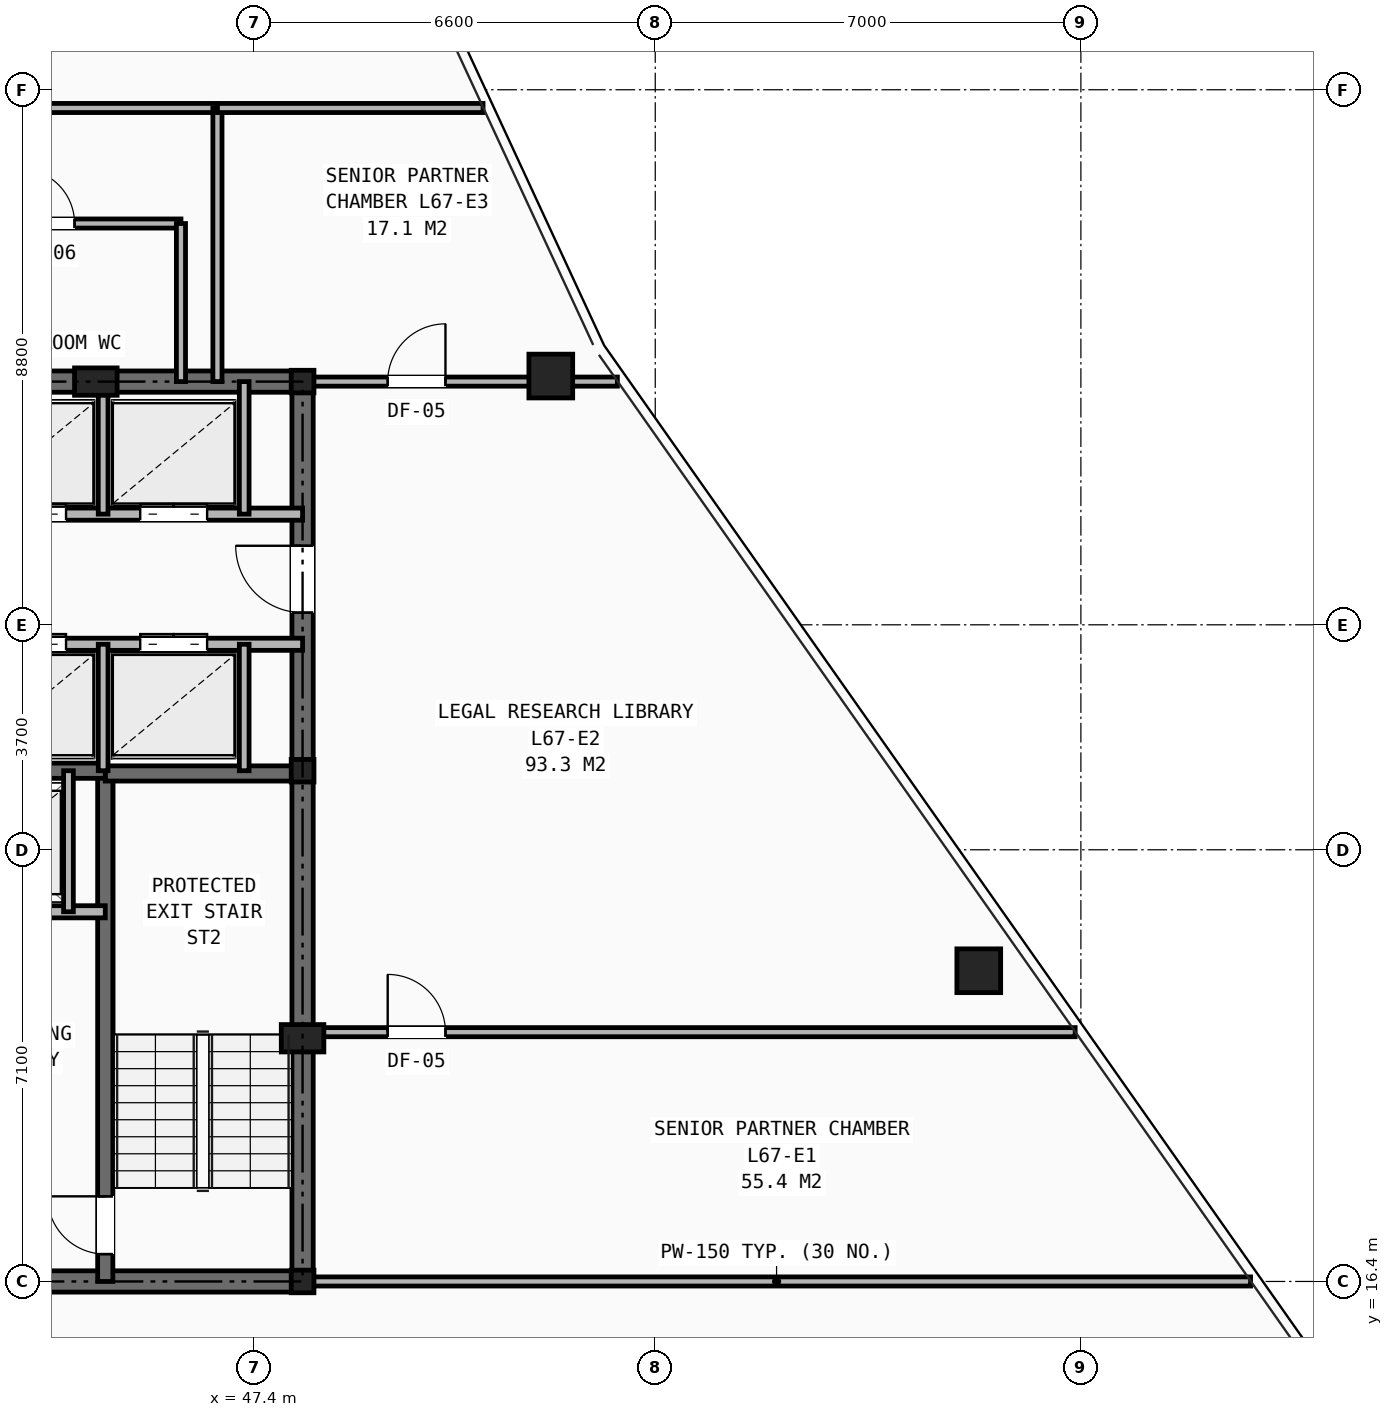
"""IFC4 building model, lengths in metres.
Left out: names, types, materials, properties, quantities, classifications, styles, units other than length and angle.
Written with IfcOpenShell. Run it as: python <this file> out.ifc"""

import sys

from ifc_helpers import new_model, si_unit, direction, frame, frame_2d, origin, origin_2d, place, context, subcontext, project, spatial, rectangle, hollow_rectangle, i_section, extrude, element, fill, save


model = new_model("IFC4")
c1 = context("Model", 3, precision=1e-05, world=origin(), true_north=direction((0.0, 1.0)))
c2 = subcontext(c1, "Body", "Model", "MODEL_VIEW")
j1 = project(units=[si_unit("LENGTHUNIT", "METRE"), si_unit("PLANEANGLEUNIT", "RADIAN")], contexts=[c1])
p1 = place(None, origin())
s1 = spatial("IfcSite", under=j1, at=p1, CompositionType="ELEMENT")
p2 = place(p1, origin())
s2 = spatial("IfcBuilding", under=s1, at=p2, CompositionType="ELEMENT")
p3 = place(p2, frame((0.0, 0.0, 236.4)))
s3 = spatial("IfcBuildingStorey", under=s2, at=p3, CompositionType="ELEMENT", Elevation=236.4)
for number, where, z_axis, x_axis in (
    (1, (48.2, 16.4, 0.0), (0.0, 0.0, 1.0), (1.0, 0.0, 0.0)),
    (2, (48.2, 24.8, 0.0), (0.0, 0.0, 1.0), (1.0, 0.0, 0.0)),
    (3, (48.2, 31.2, 0.0), (0.0, 0.0, 1.0), (1.0, 0.0, 0.0)),
):
    element("IfcColumn", number, at=place(p3, frame(where, z_axis=z_axis, x_axis=x_axis)), inside=s3, PredefinedType="COLUMN", context=c2, shape_type="SweptSolid", body=[
        extrude(i_section(OverallWidth=0.374, OverallDepth=0.372, WebThickness=0.016, FlangeThickness=0.026, at=origin_2d()), origin(), (0.0, 0.0, 1.0), 3.5),
    ])
for number, where, z_axis, x_axis in (
    (4, (48.2, 20.4, 0.0), (0.0, 0.0, 1.0), (1.0, 0.0, 0.0)),
    (5, (44.8, 31.2, 0.0), (0.0, 0.0, 1.0), (1.0, 0.0, 0.0)),
):
    element("IfcColumn", number, at=place(p3, frame(where, z_axis=z_axis, x_axis=x_axis)), inside=s3, PredefinedType="PILASTER", context=c2, shape_type="SweptSolid", body=[
        extrude(rectangle(XDim=0.7, YDim=0.45, at=origin_2d()), origin(), (0.0, 0.0, 1.0), 3.5),
    ])
for number, where, z_axis, x_axis in (
    (6, (59.321, 21.51, 0.0), (0.0, 0.0, 1.0), (1.0, 0.0, 0.0)),
    (7, (52.282, 31.291, 0.0), (0.0, 0.0, 1.0), (1.0, 0.0, 0.0)),
):
    element("IfcColumn", number, at=place(p3, frame(where, z_axis=z_axis, x_axis=x_axis)), inside=s3, PredefinedType="COLUMN", context=c2, shape_type="SweptSolid", body=[
        extrude(hollow_rectangle(XDim=0.72, YDim=0.72, WallThickness=0.05, at=origin_2d()), origin(), (0.0, 0.0, 1.0), 3.5),
    ])
p4 = place(p3, frame((31.8, 16.4, 0.0), z_axis=(0.0, 0.0, 1.0), x_axis=(1.0, 0.0, 0.0)))
e8 = element("IfcWall", 8, at=p4, inside=s3, PredefinedType="SHEAR", context=c2, shape_type="SweptSolid", body=[
    extrude(rectangle(XDim=16.4, YDim=0.35, at=frame_2d((8.2, 0.0))), origin(), (0.0, 0.0, 1.0), 3.25),
])
p5 = place(p4, frame((7.75, 0.0, 0.0)))
e9 = element("IfcOpeningElement", 9, at=p5, cuts=e8, PredefinedType="OPENING", context=c2, shape_type="SweptSolid", body=[
    extrude(rectangle(XDim=0.9, YDim=2.1, at=frame_2d((0.45, 1.05))), frame((0.0, 0.185, 0.0), z_axis=(0.0, -1.0, 0.0), x_axis=(1.0, 0.0, 0.0)), (0.0, 0.0, 1.0), 0.37),
])
p6 = place(p4, frame((4.2, 0.0, 0.0)))
e10 = element("IfcOpeningElement", 10, at=p6, cuts=e8, PredefinedType="OPENING", context=c2, shape_type="SweptSolid", body=[
    extrude(rectangle(XDim=0.95, YDim=2.1, at=frame_2d((0.475, 1.05))), frame((0.0, 0.185, 0.0), z_axis=(0.0, -1.0, 0.0), x_axis=(1.0, 0.0, 0.0)), (0.0, 0.0, 1.0), 0.37),
])
p7 = place(p4, frame((10.6, 0.0, 0.0)))
e11 = element("IfcOpeningElement", 11, at=p7, cuts=e8, PredefinedType="OPENING", context=c2, shape_type="SweptSolid", body=[
    extrude(rectangle(XDim=0.95, YDim=2.1, at=frame_2d((0.475, 1.05))), frame((0.0, 0.185, 0.0), z_axis=(0.0, -1.0, 0.0), x_axis=(1.0, 0.0, 0.0)), (0.0, 0.0, 1.0), 0.37),
])
p8 = place(p3, frame((31.8, 31.2, 0.0), z_axis=(0.0, 0.0, 1.0), x_axis=(1.0, 0.0, 0.0)))
e12 = element("IfcWall", 12, at=p8, inside=s3, PredefinedType="SHEAR", context=c2, shape_type="SweptSolid", body=[
    extrude(rectangle(XDim=16.4, YDim=0.35, at=frame_2d((8.2, 0.0))), origin(), (0.0, 0.0, 1.0), 3.25),
])
p9 = place(p3, frame((48.2, 16.4, 0.0), z_axis=(0.0, 0.0, 1.0), x_axis=(0.0, 1.0, 0.0)))
e13 = element("IfcWall", 13, at=p9, inside=s3, PredefinedType="SHEAR", context=c2, shape_type="SweptSolid", body=[
    extrude(rectangle(XDim=14.8, YDim=0.35, at=frame_2d((7.4, 0.0))), origin(), (0.0, 0.0, 1.0), 3.25),
])
p10 = place(p9, frame((11.0, 0.0, 0.0)))
e14 = element("IfcOpeningElement", 14, at=p10, cuts=e13, PredefinedType="OPENING", context=c2, shape_type="SweptSolid", body=[
    extrude(rectangle(XDim=1.1, YDim=2.15, at=frame_2d((0.55, 1.075))), frame((0.0, 0.185, 0.0), z_axis=(0.0, -1.0, 0.0), x_axis=(1.0, 0.0, 0.0)), (0.0, 0.0, 1.0), 0.37),
])
p11 = place(p3, frame((44.955, 16.4, 0.0), z_axis=(0.0, 0.0, 1.0), x_axis=(0.0, 1.0, 0.0)))
e15 = element("IfcWall", 15, at=p11, inside=s3, PredefinedType="SHEAR", context=c2, shape_type="SweptSolid", body=[
    extrude(rectangle(XDim=8.4, YDim=0.25, at=frame_2d((4.2, 0.0))), origin(), (0.0, 0.0, 1.0), 3.25),
])
p12 = place(p11, frame((0.45, 0.0, 0.0)))
e16 = element("IfcOpeningElement", 16, at=p12, cuts=e15, PredefinedType="OPENING", context=c2, shape_type="SweptSolid", body=[
    extrude(rectangle(XDim=0.95, YDim=2.1, at=frame_2d((0.475, 1.05))), frame((0.0, 0.135, 0.0), z_axis=(0.0, -1.0, 0.0), x_axis=(1.0, 0.0, 0.0)), (0.0, 0.0, 1.0), 0.27),
])
p13 = place(p3, frame((44.955, 24.755, 0.0), z_axis=(0.0, 0.0, 1.0), x_axis=(1.0, 0.0, 0.0)))
e17 = element("IfcWall", 17, at=p13, inside=s3, PredefinedType="SHEAR", context=c2, shape_type="SweptSolid", body=[
    extrude(rectangle(XDim=3.245, YDim=0.25, at=frame_2d((1.623, 0.0))), origin(), (0.0, 0.0, 1.0), 3.25),
])
p14 = place(p3, frame((35.045, 24.8, 0.0), z_axis=(0.0, 0.0, 1.0), x_axis=(1.0, 0.0, 0.0)))
e18 = element("IfcWall", 18, at=p14, inside=s3, PredefinedType="SHEAR", context=c2, shape_type="SweptSolid", body=[
    extrude(rectangle(XDim=9.91, YDim=0.25, at=frame_2d((4.955, 0.0))), origin(), (0.0, 0.0, 1.0), 3.25),
])
p15 = place(p3, frame((35.045, 22.48, 0.0), z_axis=(0.0, 0.0, 1.0), x_axis=(1.0, 0.0, 0.0)))
e19 = element("IfcWall", 19, at=p15, inside=s3, PredefinedType="SOLIDWALL", context=c2, shape_type="SweptSolid", body=[
    extrude(rectangle(XDim=9.91, YDim=0.2, at=frame_2d((4.955, 0.0))), origin(), (0.0, 0.0, 1.0), 3.25),
])
p16 = place(p15, frame((1.255, 0.0, 0.0)))
e20 = element("IfcOpeningElement", 20, at=p16, cuts=e19, PredefinedType="OPENING", context=c2, shape_type="SweptSolid", body=[
    extrude(rectangle(XDim=1.1, YDim=2.15, at=frame_2d((0.55, 1.075))), frame((0.0, 0.11, 0.0), z_axis=(0.0, -1.0, 0.0), x_axis=(1.0, 0.0, 0.0)), (0.0, 0.0, 1.0), 0.22),
])
p17 = place(p15, frame((7.555, 0.0, 0.0)))
e21 = element("IfcOpeningElement", 21, at=p17, cuts=e19, PredefinedType="OPENING", context=c2, shape_type="SweptSolid", body=[
    extrude(rectangle(XDim=1.1, YDim=2.15, at=frame_2d((0.55, 1.075))), frame((0.0, 0.11, 0.0), z_axis=(0.0, -1.0, 0.0), x_axis=(1.0, 0.0, 0.0)), (0.0, 0.0, 1.0), 0.22),
])
p18 = place(p15, frame((4.405, 0.0, 0.0)))
e22 = element("IfcOpeningElement", 22, at=p18, cuts=e19, PredefinedType="OPENING", context=c2, shape_type="SweptSolid", body=[
    extrude(rectangle(XDim=1.1, YDim=2.15, at=frame_2d((0.55, 1.075))), frame((0.0, 0.11, 0.0), z_axis=(0.0, -1.0, 0.0), x_axis=(1.0, 0.0, 0.0)), (0.0, 0.0, 1.0), 0.22),
])
p19 = place(p3, frame((44.35, 22.48, 0.0), z_axis=(0.0, 0.0, 1.0), x_axis=(0.0, 1.0, 0.0)))
e23 = element("IfcWall", 23, at=p19, inside=s3, PredefinedType="SOLIDWALL", context=c2, shape_type="SweptSolid", body=[
    extrude(rectangle(XDim=2.32, YDim=0.16, at=frame_2d((1.16, 0.0))), origin(), (0.0, 0.0, 1.0), 3.25),
])
p20 = place(p3, frame((31.8, 29.02, 0.0), z_axis=(0.0, 0.0, 1.0), x_axis=(1.0, 0.0, 0.0)))
e24 = element("IfcWall", 24, at=p20, inside=s3, PredefinedType="SOLIDWALL", context=c2, shape_type="SweptSolid", body=[
    extrude(rectangle(XDim=16.4, YDim=0.2, at=frame_2d((8.2, 0.0))), origin(), (0.0, 0.0, 1.0), 2.705),
])
p21 = place(p20, frame((0.55, 0.0, 0.0)))
e25 = element("IfcOpeningElement", 25, at=p21, cuts=e24, PredefinedType="OPENING", context=c2, shape_type="SweptSolid", body=[
    extrude(rectangle(XDim=0.85, YDim=2.05, at=frame_2d((0.425, 1.025))), frame((0.0, 0.11, 0.0), z_axis=(0.0, -1.0, 0.0), x_axis=(1.0, 0.0, 0.0)), (0.0, 0.0, 1.0), 0.22),
])
p22 = place(p20, frame((5.94, 0.0, 0.0)))
e26 = element("IfcOpeningElement", 26, at=p22, cuts=e24, PredefinedType="OPENING", context=c2, shape_type="SweptSolid", body=[
    extrude(rectangle(XDim=0.9, YDim=2.1, at=frame_2d((0.45, 1.05))), frame((0.0, 0.11, 0.0), z_axis=(0.0, -1.0, 0.0), x_axis=(1.0, 0.0, 0.0)), (0.0, 0.0, 1.0), 0.22),
])
p23 = place(p20, frame((11.41, 0.0, 0.0)))
e27 = element("IfcOpeningElement", 27, at=p23, cuts=e24, PredefinedType="OPENING", context=c2, shape_type="SweptSolid", body=[
    extrude(rectangle(XDim=1.1, YDim=2.15, at=frame_2d((0.55, 1.075))), frame((0.0, 0.11, 0.0), z_axis=(0.0, -1.0, 0.0), x_axis=(1.0, 0.0, 0.0)), (0.0, 0.0, 1.0), 0.22),
])
p24 = place(p20, frame((13.73, 0.0, 0.0)))
e28 = element("IfcOpeningElement", 28, at=p24, cuts=e24, PredefinedType="OPENING", context=c2, shape_type="SweptSolid", body=[
    extrude(rectangle(XDim=1.1, YDim=2.15, at=frame_2d((0.55, 1.075))), frame((0.0, 0.11, 0.0), z_axis=(0.0, -1.0, 0.0), x_axis=(1.0, 0.0, 0.0)), (0.0, 0.0, 1.0), 0.22),
])
p25 = place(p3, frame((33.82, 26.88, 0.0), z_axis=(0.0, 0.0, 1.0), x_axis=(1.0, 0.0, 0.0)))
e29 = element("IfcWall", 29, at=p25, inside=s3, PredefinedType="SOLIDWALL", context=c2, shape_type="SweptSolid", body=[
    extrude(rectangle(XDim=14.38, YDim=0.2, at=frame_2d((7.19, 0.0))), origin(), (0.0, 0.0, 1.0), 2.705),
])
p26 = place(p25, frame((3.92, 0.0, 0.0)))
e30 = element("IfcOpeningElement", 30, at=p26, cuts=e29, PredefinedType="OPENING", context=c2, shape_type="SweptSolid", body=[
    extrude(rectangle(XDim=0.9, YDim=2.1, at=frame_2d((0.45, 1.05))), frame((0.0, 0.11, 0.0), z_axis=(0.0, -1.0, 0.0), x_axis=(1.0, 0.0, 0.0)), (0.0, 0.0, 1.0), 0.22),
])
p27 = place(p25, frame((9.39, 0.0, 0.0)))
e31 = element("IfcOpeningElement", 31, at=p27, cuts=e29, PredefinedType="OPENING", context=c2, shape_type="SweptSolid", body=[
    extrude(rectangle(XDim=1.1, YDim=2.15, at=frame_2d((0.55, 1.075))), frame((0.0, 0.11, 0.0), z_axis=(0.0, -1.0, 0.0), x_axis=(1.0, 0.0, 0.0)), (0.0, 0.0, 1.0), 0.22),
])
p28 = place(p25, frame((11.71, 0.0, 0.0)))
e32 = element("IfcOpeningElement", 32, at=p28, cuts=e29, PredefinedType="OPENING", context=c2, shape_type="SweptSolid", body=[
    extrude(rectangle(XDim=1.1, YDim=2.15, at=frame_2d((0.55, 1.075))), frame((0.0, 0.11, 0.0), z_axis=(0.0, -1.0, 0.0), x_axis=(1.0, 0.0, 0.0)), (0.0, 0.0, 1.0), 0.22),
])
for number, where, z_axis, x_axis in (
    (33, (44.92, 29.02, 0.0), (0.0, 0.0, 1.0), (0.0, 1.0, 0.0)),
    (34, (47.24, 29.02, 0.0), (0.0, 0.0, 1.0), (0.0, 1.0, 0.0)),
):
    element("IfcWall", number, at=place(p3, frame(where, z_axis=z_axis, x_axis=x_axis)), inside=s3, PredefinedType="SOLIDWALL", context=c2, shape_type="SweptSolid", body=[
        extrude(rectangle(XDim=2.18, YDim=0.16, at=frame_2d((1.09, 0.0))), origin(), (0.0, 0.0, 1.0), 2.705),
    ])
for number, where, z_axis, x_axis in (
    (35, (44.92, 24.8, 0.0), (0.0, 0.0, 1.0), (0.0, 1.0, 0.0)),
    (36, (47.24, 24.8, 0.0), (0.0, 0.0, 1.0), (0.0, 1.0, 0.0)),
):
    element("IfcWall", number, at=place(p3, frame(where, z_axis=z_axis, x_axis=x_axis)), inside=s3, PredefinedType="SOLIDWALL", context=c2, shape_type="SweptSolid", body=[
        extrude(rectangle(XDim=2.08, YDim=0.16, at=frame_2d((1.04, 0.0))), origin(), (0.0, 0.0, 1.0), 3.25),
    ])
p29 = place(p3, frame((33.2, 33.8, 0.0), z_axis=(0.0, 0.0, 1.0), x_axis=(1.0, 0.0, 0.0)))
e37 = element("IfcWall", 37, at=p29, inside=s3, PredefinedType="PARTITIONING", context=c2, shape_type="SweptSolid", body=[
    extrude(rectangle(XDim=13.0, YDim=0.15, at=frame_2d((6.5, 0.0))), origin(), (0.0, 0.0, 1.0), 3.25),
])
p30 = place(p29, frame((1.7, 0.0, 0.0)))
e38 = element("IfcOpeningElement", 38, at=p30, cuts=e37, PredefinedType="OPENING", context=c2, shape_type="SweptSolid", body=[
    extrude(rectangle(XDim=0.9, YDim=2.1, at=frame_2d((0.45, 1.05))), frame((0.0, 0.085, 0.0), z_axis=(0.0, -1.0, 0.0), x_axis=(1.0, 0.0, 0.0)), (0.0, 0.0, 1.0), 0.17),
])
p31 = place(p29, frame((6.0, 0.0, 0.0)))
e39 = element("IfcOpeningElement", 39, at=p31, cuts=e37, PredefinedType="OPENING", context=c2, shape_type="SweptSolid", body=[
    extrude(rectangle(XDim=0.9, YDim=2.1, at=frame_2d((0.45, 1.05))), frame((0.0, 0.085, 0.0), z_axis=(0.0, -1.0, 0.0), x_axis=(1.0, 0.0, 0.0)), (0.0, 0.0, 1.0), 0.17),
])
p32 = place(p29, frame((10.35, 0.0, 0.0)))
e40 = element("IfcOpeningElement", 40, at=p32, cuts=e37, PredefinedType="OPENING", context=c2, shape_type="SweptSolid", body=[
    extrude(rectangle(XDim=0.9, YDim=2.1, at=frame_2d((0.45, 1.05))), frame((0.0, 0.085, 0.0), z_axis=(0.0, -1.0, 0.0), x_axis=(1.0, 0.0, 0.0)), (0.0, 0.0, 1.0), 0.17),
])
p33 = place(p3, frame((46.2, 31.2, 0.0), z_axis=(0.0, 0.0, 1.0), x_axis=(0.0, 1.0, 0.0)))
e41 = element("IfcWall", 41, at=p33, inside=s3, PredefinedType="PARTITIONING", context=c2, shape_type="SweptSolid", body=[
    extrude(rectangle(XDim=2.6, YDim=0.15, at=frame_2d((1.3, 0.0))), origin(), (0.0, 0.0, 1.0), 2.705),
])
p34 = place(p3, frame((48.2, 16.4, 0.0), z_axis=(0.0, 0.0, 1.0), x_axis=(1.0, 0.0, 0.0)))
e42 = element("IfcWall", 42, at=p34, inside=s3, PredefinedType="PARTITIONING", context=c2, shape_type="SweptSolid", body=[
    extrude(rectangle(XDim=15.591, YDim=0.15, at=frame_2d((7.795, 0.0))), origin(), (0.0, 0.0, 1.0), 2.292),
])
p35 = place(p3, frame((40.75, 35.7, 0.0), z_axis=(0.0, 0.0, 1.0), x_axis=(1.0, 0.0, 0.0)))
e43 = element("IfcWall", 43, at=p35, inside=s3, PredefinedType="PARTITIONING", context=c2, shape_type="SweptSolid", body=[
    extrude(rectangle(XDim=6.05, YDim=0.15, at=frame_2d((3.025, 0.0))), origin(), (0.0, 0.0, 1.0), 3.25),
])
p36 = place(p35, frame((0.2, 0.0, 0.0)))
e44 = element("IfcOpeningElement", 44, at=p36, cuts=e43, PredefinedType="OPENING", context=c2, shape_type="SweptSolid", body=[
    extrude(rectangle(XDim=0.95, YDim=2.1, at=frame_2d((0.475, 1.05))), frame((0.0, 0.085, 0.0), z_axis=(0.0, -1.0, 0.0), x_axis=(1.0, 0.0, 0.0)), (0.0, 0.0, 1.0), 0.17),
])
p37 = place(p3, frame((46.8, 31.2, 0.0), z_axis=(0.0, 0.0, 1.0), x_axis=(0.0, 1.0, 0.0)))
e45 = element("IfcWall", 45, at=p37, inside=s3, PredefinedType="PARTITIONING", context=c2, shape_type="SweptSolid", body=[
    extrude(rectangle(XDim=4.5, YDim=0.15, at=frame_2d((2.25, 0.0))), origin(), (0.0, 0.0, 1.0), 2.705),
])
p38 = place(p3, frame((46.8, 35.7, 0.0), z_axis=(0.0, 0.0, 1.0), x_axis=(1.0, 0.0, 0.0)))
e46 = element("IfcWall", 46, at=p38, inside=s3, PredefinedType="PARTITIONING", context=c2, shape_type="SweptSolid", body=[
    extrude(rectangle(XDim=4.368, YDim=0.15, at=frame_2d((2.184, 0.0))), origin(), (0.0, 0.0, 1.0), 2.628),
])
p39 = place(p3, frame((48.2, 20.5, 0.0), z_axis=(0.0, 0.0, 1.0), x_axis=(1.0, 0.0, 0.0)))
e47 = element("IfcWall", 47, at=p39, inside=s3, PredefinedType="PARTITIONING", context=c2, shape_type="SweptSolid", body=[
    extrude(rectangle(XDim=12.706, YDim=0.15, at=frame_2d((6.353, 0.0))), origin(), (0.0, 0.0, 1.0), 2.292),
])
p40 = place(p39, frame((1.4, 0.0, 0.0)))
e48 = element("IfcOpeningElement", 48, at=p40, cuts=e47, PredefinedType="OPENING", context=c2, shape_type="SweptSolid", body=[
    extrude(rectangle(XDim=0.95, YDim=2.1, at=frame_2d((0.475, 1.05))), frame((0.0, 0.085, 0.0), z_axis=(0.0, -1.0, 0.0), x_axis=(1.0, 0.0, 0.0)), (0.0, 0.0, 1.0), 0.17),
])
p41 = place(p3, frame((48.2, 31.2, 0.0), z_axis=(0.0, 0.0, 1.0), x_axis=(1.0, 0.0, 0.0)))
e49 = element("IfcWall", 49, at=p41, inside=s3, PredefinedType="PARTITIONING", context=c2, shape_type="SweptSolid", body=[
    extrude(rectangle(XDim=5.177, YDim=0.15, at=frame_2d((2.589, 0.0))), origin(), (0.0, 0.0, 1.0), 2.292),
])
p42 = place(p41, frame((1.4, 0.0, 0.0)))
e50 = element("IfcOpeningElement", 50, at=p42, cuts=e49, PredefinedType="OPENING", context=c2, shape_type="SweptSolid", body=[
    extrude(rectangle(XDim=0.95, YDim=2.1, at=frame_2d((0.475, 1.05))), frame((0.0, 0.085, 0.0), z_axis=(0.0, -1.0, 0.0), x_axis=(1.0, 0.0, 0.0)), (0.0, 0.0, 1.0), 0.17),
])
p43 = place(p12, origin())
e51 = element("IfcDoor", 51, at=p43, inside=s3, OperationType="SINGLE_SWING_RIGHT", PredefinedType="DOOR", context=c2, shape_type="SweptSolid", body=[
    extrude(rectangle(XDim=0.95, YDim=2.1, at=frame_2d((0.475, 1.05))), frame((0.0, 0.025, 0.0), z_axis=(0.0, -1.0, 0.0), x_axis=(1.0, 0.0, 0.0)), (0.0, 0.0, 1.0), 0.05),
])
fill(e16, e51)
p44 = place(p10, origin())
e52 = element("IfcDoor", 52, at=p44, inside=s3, OperationType="SINGLE_SWING_RIGHT", PredefinedType="DOOR", context=c2, shape_type="SweptSolid", body=[
    extrude(rectangle(XDim=1.1, YDim=2.15, at=frame_2d((0.55, 1.075))), frame((0.0, 0.025, 0.0), z_axis=(0.0, -1.0, 0.0), x_axis=(1.0, 0.0, 0.0)), (0.0, 0.0, 1.0), 0.05),
])
fill(e14, e52)
p45 = place(p23, origin())
e53 = element("IfcDoor", 53, at=p45, inside=s3, OperationType="DOUBLE_DOOR_SLIDING", PredefinedType="DOOR", context=c2, shape_type="SweptSolid", body=[
    extrude(rectangle(XDim=1.1, YDim=2.15, at=frame_2d((0.55, 1.075))), frame((0.0, 0.025, 0.0), z_axis=(0.0, -1.0, 0.0), x_axis=(1.0, 0.0, 0.0)), (0.0, 0.0, 1.0), 0.05),
])
fill(e27, e53)
p46 = place(p24, origin())
e54 = element("IfcDoor", 54, at=p46, inside=s3, OperationType="DOUBLE_DOOR_SLIDING", PredefinedType="DOOR", context=c2, shape_type="SweptSolid", body=[
    extrude(rectangle(XDim=1.1, YDim=2.15, at=frame_2d((0.55, 1.075))), frame((0.0, 0.025, 0.0), z_axis=(0.0, -1.0, 0.0), x_axis=(1.0, 0.0, 0.0)), (0.0, 0.0, 1.0), 0.05),
])
fill(e28, e54)
p47 = place(p27, origin())
e55 = element("IfcDoor", 55, at=p47, inside=s3, OperationType="DOUBLE_DOOR_SLIDING", PredefinedType="DOOR", context=c2, shape_type="SweptSolid", body=[
    extrude(rectangle(XDim=1.1, YDim=2.15, at=frame_2d((0.55, 1.075))), frame((0.0, 0.025, 0.0), z_axis=(0.0, -1.0, 0.0), x_axis=(1.0, 0.0, 0.0)), (0.0, 0.0, 1.0), 0.05),
])
fill(e31, e55)
p48 = place(p28, origin())
e56 = element("IfcDoor", 56, at=p48, inside=s3, OperationType="DOUBLE_DOOR_SLIDING", PredefinedType="DOOR", context=c2, shape_type="SweptSolid", body=[
    extrude(rectangle(XDim=1.1, YDim=2.15, at=frame_2d((0.55, 1.075))), frame((0.0, 0.025, 0.0), z_axis=(0.0, -1.0, 0.0), x_axis=(1.0, 0.0, 0.0)), (0.0, 0.0, 1.0), 0.05),
])
fill(e32, e56)
p49 = place(p32, origin())
e57 = element("IfcDoor", 57, at=p49, inside=s3, OperationType="SINGLE_SWING_LEFT", PredefinedType="DOOR", context=c2, shape_type="SweptSolid", body=[
    extrude(rectangle(XDim=0.9, YDim=2.1, at=frame_2d((0.45, 1.05))), frame((0.0, 0.025, 0.0), z_axis=(0.0, -1.0, 0.0), x_axis=(1.0, 0.0, 0.0)), (0.0, 0.0, 1.0), 0.05),
])
fill(e40, e57)
p50 = place(p40, origin())
e58 = element("IfcDoor", 58, at=p50, inside=s3, OperationType="SINGLE_SWING_LEFT", PredefinedType="DOOR", context=c2, shape_type="SweptSolid", body=[
    extrude(rectangle(XDim=0.95, YDim=2.1, at=frame_2d((0.475, 1.05))), frame((0.0, 0.025, 0.0), z_axis=(0.0, -1.0, 0.0), x_axis=(1.0, 0.0, 0.0)), (0.0, 0.0, 1.0), 0.05),
])
fill(e48, e58)
p51 = place(p42, origin())
e59 = element("IfcDoor", 59, at=p51, inside=s3, OperationType="SINGLE_SWING_RIGHT", PredefinedType="DOOR", context=c2, shape_type="SweptSolid", body=[
    extrude(rectangle(XDim=0.95, YDim=2.1, at=frame_2d((0.475, 1.05))), frame((0.0, 0.025, 0.0), z_axis=(0.0, -1.0, 0.0), x_axis=(1.0, 0.0, 0.0)), (0.0, 0.0, 1.0), 0.05),
])
fill(e50, e59)
save(model, sys.argv[1])
